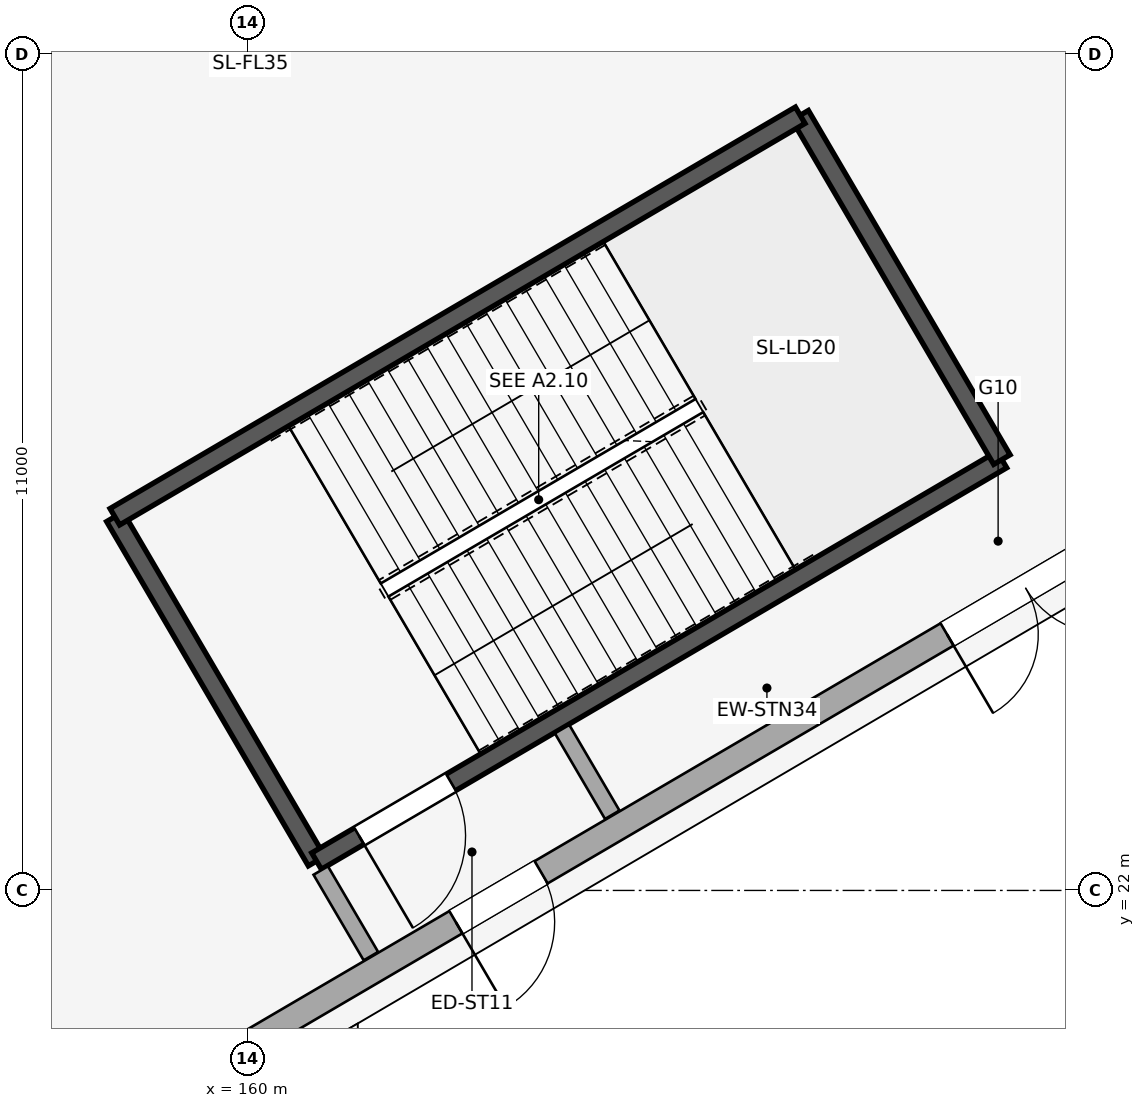
"""IFC4 building model, lengths in metres.
Left out: names, types, materials, properties, quantities, classifications, styles, units other than length and angle.
Written with IfcOpenShell. Run it as: python <this file> out.ifc"""

import sys

from ifc_helpers import new_model, si_unit, direction, frame, frame_2d, origin, place, context, subcontext, project, spatial, rectangle, extrude, element, fill, save


model = new_model("IFC4")
c1 = context("Model", 3, precision=1e-05, world=origin(), true_north=direction((0.0, 1.0)))
c2 = subcontext(c1, "Body", "Model", "MODEL_VIEW")
j1 = project(units=[si_unit("LENGTHUNIT", "METRE"), si_unit("PLANEANGLEUNIT", "RADIAN")], contexts=[c1])
p1 = place(None, origin())
s1 = spatial("IfcSite", under=j1, at=p1, CompositionType="ELEMENT")
p2 = place(p1, origin())
s2 = spatial("IfcBuilding", under=s1, at=p2, CompositionType="ELEMENT")
p3 = place(p2, origin())
s3 = spatial("IfcBuildingStorey", under=s2, at=p3, CompositionType="ELEMENT", Elevation=0.0)
p4 = place(p3, frame((157.897, 18.745, 0.0), z_axis=(0.0, 0.0, 1.0), x_axis=(0.862843632099, 0.505470935413, 0.0)))
e1 = element("IfcWall", 1, at=p4, inside=s3, PredefinedType="STANDARD", context=c2, shape_type="SweptSolid", body=[
    extrude(rectangle(XDim=21.403, YDim=0.34, at=frame_2d((10.701, 0.0))), origin(), (0.0, 0.0, 1.0), 3.85),
])
p5 = place(p4, frame((5.613, 0.0, 0.0)))
e2 = element("IfcOpeningElement", 2, at=p5, cuts=e1, PredefinedType="OPENING", context=c2, shape_type="SweptSolid", body=[
    extrude(rectangle(XDim=1.3, YDim=2.2, at=frame_2d((0.65, 1.1))), frame((0.0, 0.18, 0.0), z_axis=(0.0, -1.0, 0.0), x_axis=(1.0, 0.0, 0.0)), (0.0, 0.0, 1.0), 0.36),
])
p6 = place(p4, frame((13.103, 0.0, 0.0)))
e3 = element("IfcOpeningElement", 3, at=p6, cuts=e1, PredefinedType="OPENING", context=c2, shape_type="SweptSolid", body=[
    extrude(rectangle(XDim=2.4, YDim=2.4, at=frame_2d((1.2, 1.2))), frame((0.0, 0.18, 0.0), z_axis=(0.0, -1.0, 0.0), x_axis=(1.0, 0.0, 0.0)), (0.0, 0.0, 1.0), 0.36),
])
p7 = place(p3, frame((158.253, 26.916, 0.0), z_axis=(0.0, 0.0, 1.0), x_axis=(0.505460490551, -0.862849750821, 0.0)))
e4 = element("IfcWall", 4, at=p7, inside=s3, PredefinedType="SHEAR", context=c2, shape_type="SweptSolid", body=[
    extrude(rectangle(XDim=5.25, YDim=0.25, at=frame_2d((2.625, 0.0))), origin(), (0.0, 0.0, 1.0), 5.1),
])
p8 = place(p3, frame((160.907, 22.386, 0.0), z_axis=(0.0, 0.0, 1.0), x_axis=(0.862854686184, 0.505452065513, 0.0)))
e5 = element("IfcWall", 5, at=p8, inside=s3, PredefinedType="SHEAR", context=c2, shape_type="SweptSolid", body=[
    extrude(rectangle(XDim=10.45, YDim=0.25, at=frame_2d((5.225, 0.0))), origin(), (0.0, 0.0, 1.0), 5.1),
])
p9 = place(p8, frame((0.65, 0.0, 0.0)))
e6 = element("IfcOpeningElement", 6, at=p9, cuts=e5, PredefinedType="OPENING", context=c2, shape_type="SweptSolid", body=[
    extrude(rectangle(XDim=1.4, YDim=2.2, at=frame_2d((0.7, 1.1))), frame((0.0, 0.135, 0.0), z_axis=(0.0, -1.0, 0.0), x_axis=(1.0, 0.0, 0.0)), (0.0, 0.0, 1.0), 0.27),
])
p10 = place(p3, frame((169.924, 27.668, 0.0), z_axis=(0.0, 0.0, 1.0), x_axis=(-0.505474830399, 0.862841350327, 0.0)))
e7 = element("IfcWall", 7, at=p10, inside=s3, PredefinedType="SHEAR", context=c2, shape_type="SweptSolid", body=[
    extrude(rectangle(XDim=5.25, YDim=0.25, at=frame_2d((2.625, 0.0))), origin(), (0.0, 0.0, 1.0), 5.1),
])
p11 = place(p3, frame((167.27, 32.198, 0.0), z_axis=(0.0, 0.0, 1.0), x_axis=(-0.862838527648, -0.505479648657, 0.0)))
e8 = element("IfcWall", 8, at=p11, inside=s3, PredefinedType="SHEAR", context=c2, shape_type="SweptSolid", body=[
    extrude(rectangle(XDim=10.45, YDim=0.25, at=frame_2d((5.225, 0.0))), origin(), (0.0, 0.0, 1.0), 5.1),
])
for number, where, z_axis, x_axis in (
    (9, (160.962, 22.262, 0.0), (0.0, 0.0, 1.0), (0.505, -0.863, 0.0)),
    (10, (164.138, 24.122, 0.0), (0.0, 0.0, 1.0), (0.505, -0.863, 0.0)),
):
    element("IfcWall", number, at=place(p3, frame(where, z_axis=z_axis, x_axis=x_axis)), inside=s3, PredefinedType="PARTITIONING", context=c2, shape_type="SweptSolid", body=[
        extrude(rectangle(XDim=1.306, YDim=0.22, at=frame_2d((0.653, 0.0))), origin(), (0.0, 0.0, 1.0), 3.69),
    ])
p12 = place(p3, frame((150.207, 30.069, 0.0), z_axis=(0.0, 0.0, 1.0), x_axis=(0.853141952347, 0.521678837164, 0.0)))
e11 = element("IfcWall", 11, at=p12, inside=s3, PredefinedType="PARTITIONING", context=c2, shape_type="SweptSolid", body=[
    extrude(rectangle(XDim=19.03, YDim=0.12, at=frame_2d((9.515, 0.0))), origin(), (0.0, 0.0, 1.0), 3.69),
])
p13 = place(p5, frame((1.3, 0.0, 0.0), z_axis=(0.0, 0.0, 1.0), x_axis=(-1.0, 0.0, 0.0)))
e12 = element("IfcDoor", 12, at=p13, inside=s3, OperationType="SINGLE_SWING_RIGHT", PredefinedType="DOOR", context=c2, shape_type="SweptSolid", body=[
    extrude(rectangle(XDim=1.3, YDim=2.2, at=frame_2d((0.65, 1.1))), frame((0.0, 0.025, 0.0), z_axis=(0.0, -1.0, 0.0), x_axis=(1.0, 0.0, 0.0)), (0.0, 0.0, 1.0), 0.05),
])
fill(e2, e12)
p14 = place(p6, frame((2.4, 0.0, 0.0), z_axis=(0.0, 0.0, 1.0), x_axis=(-1.0, 0.0, 0.0)))
e13 = element("IfcDoor", 13, at=p14, inside=s3, OperationType="DOUBLE_DOOR_SINGLE_SWING", PredefinedType="DOOR", context=c2, shape_type="SweptSolid", body=[
    extrude(rectangle(XDim=2.4, YDim=2.4, at=frame_2d((1.2, 1.2))), frame((0.0, 0.025, 0.0), z_axis=(0.0, -1.0, 0.0), x_axis=(1.0, 0.0, 0.0)), (0.0, 0.0, 1.0), 0.05),
])
fill(e3, e13)
p15 = place(p9, frame((1.4, 0.0, 0.0), z_axis=(0.0, 0.0, 1.0), x_axis=(-1.0, 0.0, 0.0)))
e14 = element("IfcDoor", 14, at=p15, inside=s3, OperationType="SINGLE_SWING_RIGHT", PredefinedType="DOOR", context=c2, shape_type="SweptSolid", body=[
    extrude(rectangle(XDim=1.4, YDim=2.2, at=frame_2d((0.7, 1.1))), frame((0.0, 0.025, 0.0), z_axis=(0.0, -1.0, 0.0), x_axis=(1.0, 0.0, 0.0)), (0.0, 0.0, 1.0), 0.05),
])
fill(e6, e14)
save(model, sys.argv[1])
